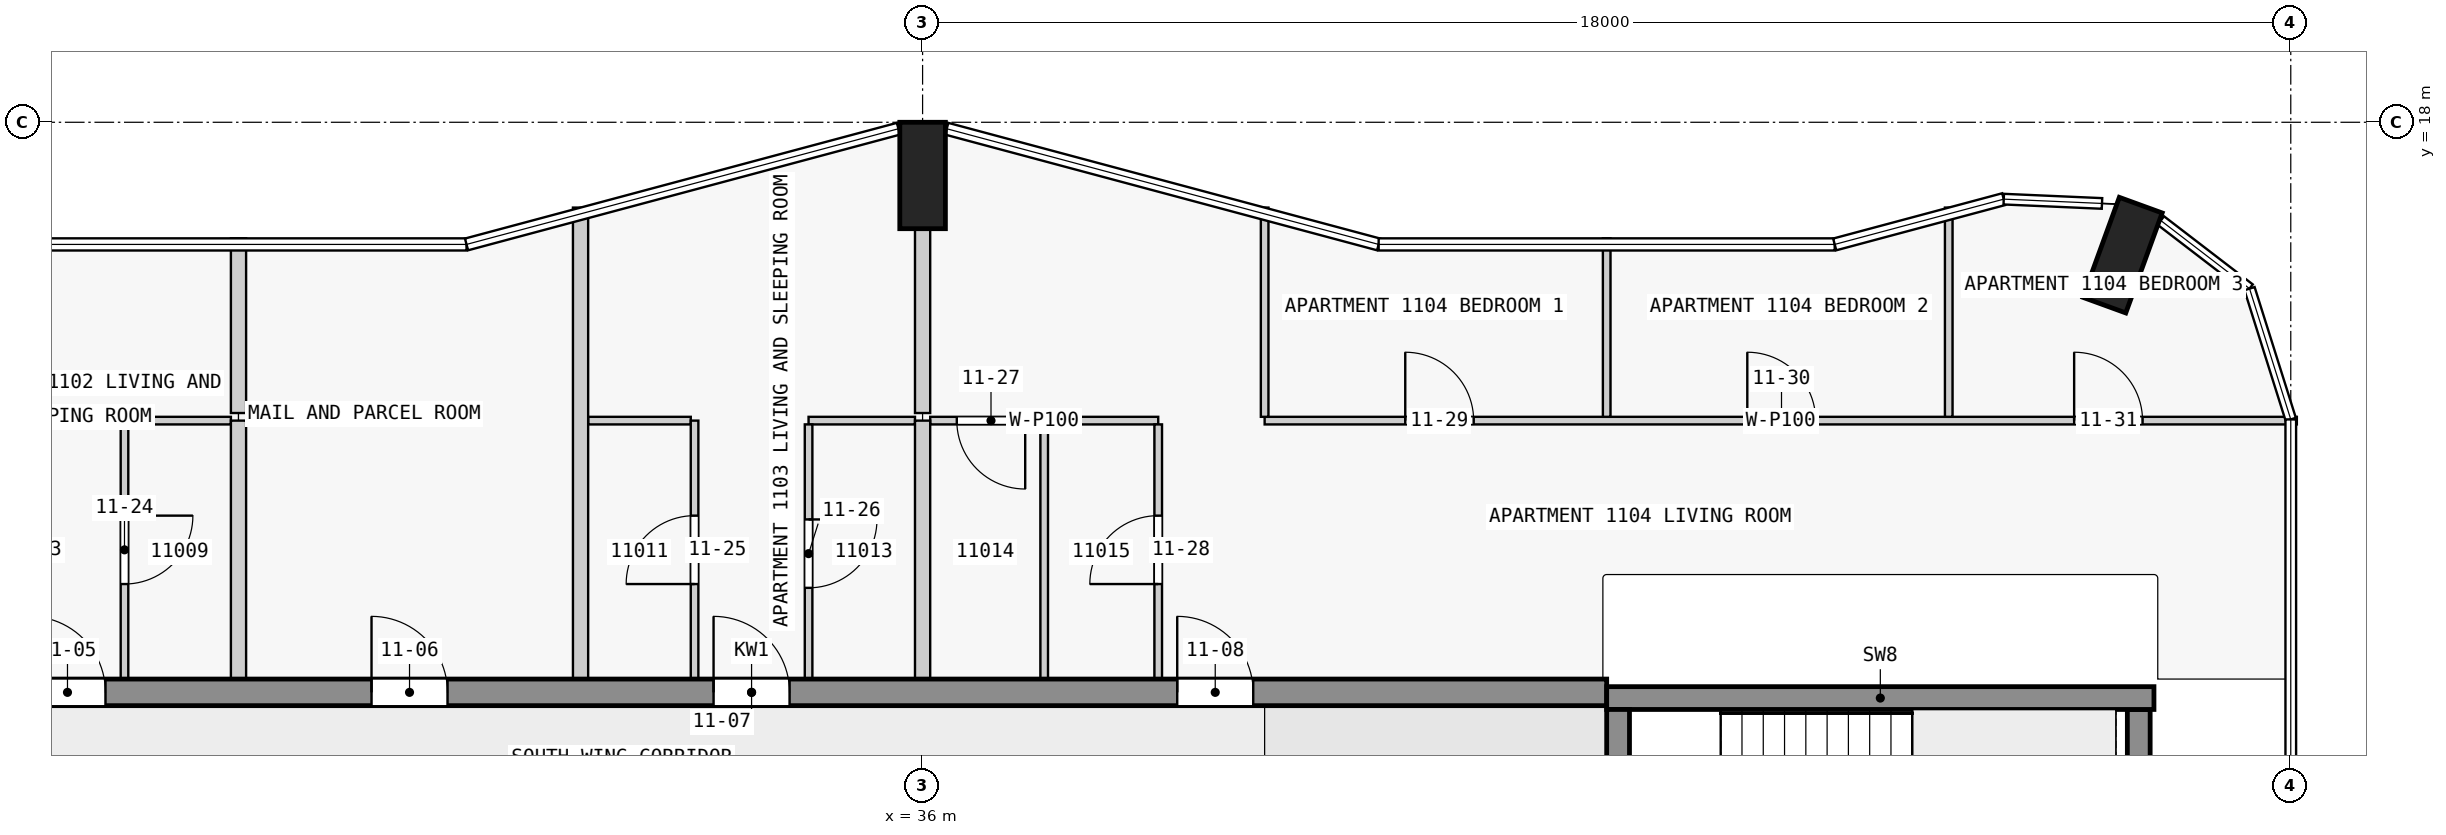
"""IFC4 building model, lengths in metres.
Left out: names, types, materials, properties, quantities, classifications, styles, units other than length and angle.
Written with IfcOpenShell. Run it as: python <this file> out.ifc"""

import sys

from ifc_helpers import new_model, si_unit, direction, frame, frame_2d, origin, origin_2d, place, context, subcontext, project, spatial, rectangle, extrude, element, fill, save


model = new_model("IFC4")
c1 = context("Model", 3, precision=1e-05, world=origin(), true_north=direction((0.0, 1.0)))
c2 = subcontext(c1, "Body", "Model", "MODEL_VIEW")
j1 = project(units=[si_unit("LENGTHUNIT", "METRE"), si_unit("PLANEANGLEUNIT", "RADIAN")], contexts=[c1])
p1 = place(None, origin())
s1 = spatial("IfcSite", under=j1, at=p1, CompositionType="ELEMENT")
p2 = place(p1, origin())
s2 = spatial("IfcBuilding", under=s1, at=p2, CompositionType="ELEMENT")
p3 = place(p2, frame((0.0, 0.0, 47.8)))
s3 = spatial("IfcBuildingStorey", under=s2, at=p3, CompositionType="ELEMENT", Elevation=47.8)
for number, where, z_axis, x_axis in (
    (1, (51.787, 16.252, 0.0), (0.0, 0.0, 1.0), (-0.94, 0.342, 0.0)),
    (2, (36.0, 17.3, 0.0), (0.0, 0.0, 1.0), (1.0, 0.0, 0.0)),
):
    element("IfcColumn", number, at=place(p3, frame(where, z_axis=z_axis, x_axis=x_axis)), inside=s3, PredefinedType="COLUMN", context=c2, shape_type="SweptSolid", body=[
        extrude(rectangle(XDim=0.6, YDim=1.4, at=origin_2d()), origin(), (0.0, 0.0, 1.0), 3.5),
    ])
p4 = place(p3, frame((45.15, 7.725, 0.0), z_axis=(0.0, 0.0, 1.0), x_axis=(0.0, 1.0, 0.0)))
e3 = element("IfcWall", 3, at=p4, inside=s3, PredefinedType="SHEAR", context=c2, shape_type="SweptSolid", body=[
    extrude(rectangle(XDim=2.55, YDim=0.3, at=frame_2d((1.275, 0.0))), origin(), (0.0, 0.0, 1.0), 3.5),
])
p5 = place(p4, frame((0.725, 0.0, 0.0)))
e4 = element("IfcOpeningElement", 4, at=p5, cuts=e3, PredefinedType="OPENING", context=c2, shape_type="SweptSolid", body=[
    extrude(rectangle(XDim=1.1, YDim=2.1, at=frame_2d((0.55, 1.05))), frame((0.0, 0.16, 0.0), z_axis=(0.0, -1.0, 0.0), x_axis=(1.0, 0.0, 0.0)), (0.0, 0.0, 1.0), 0.32),
])
p6 = place(p3, frame((52.0, 7.725, 0.0), z_axis=(0.0, 0.0, 1.0), x_axis=(0.0, 1.0, 0.0)))
e5 = element("IfcWall", 5, at=p6, inside=s3, PredefinedType="SHEAR", context=c2, shape_type="SweptSolid", body=[
    extrude(rectangle(XDim=2.55, YDim=0.3, at=frame_2d((1.275, 0.0))), origin(), (0.0, 0.0, 1.0), 3.5),
])
p7 = place(p3, frame((45.0, 10.425, 0.0), z_axis=(0.0, 0.0, 1.0), x_axis=(1.0, 0.0, 0.0)))
e6 = element("IfcWall", 6, at=p7, inside=s3, PredefinedType="SHEAR", context=c2, shape_type="SweptSolid", body=[
    extrude(rectangle(XDim=7.2, YDim=0.3, at=frame_2d((3.6, 0.0))), origin(), (0.0, 0.0, 1.0), 3.5),
])
p8 = place(p3, frame((22.5, 10.5, 0.0), z_axis=(0.0, 0.0, 1.0), x_axis=(1.0, 0.0, 0.0)))
e7 = element("IfcWall", 7, at=p8, inside=s3, PredefinedType="SHEAR", context=c2, shape_type="SweptSolid", body=[
    extrude(rectangle(XDim=22.5, YDim=0.35, at=frame_2d((11.25, 0.0))), origin(), (0.0, 0.0, 1.0), 3.25),
])
p9 = place(p8, frame((1.75, 0.0, 0.0)))
e8 = element("IfcOpeningElement", 8, at=p9, cuts=e7, PredefinedType="OPENING", context=c2, shape_type="SweptSolid", body=[
    extrude(rectangle(XDim=1.0, YDim=2.1, at=frame_2d((0.5, 1.05))), frame((0.0, 0.185, 0.0), z_axis=(0.0, -1.0, 0.0), x_axis=(1.0, 0.0, 0.0)), (0.0, 0.0, 1.0), 0.37),
])
p10 = place(p8, frame((6.25, 0.0, 0.0)))
e9 = element("IfcOpeningElement", 9, at=p10, cuts=e7, PredefinedType="OPENING", context=c2, shape_type="SweptSolid", body=[
    extrude(rectangle(XDim=1.0, YDim=2.1, at=frame_2d((0.5, 1.05))), frame((0.0, 0.185, 0.0), z_axis=(0.0, -1.0, 0.0), x_axis=(1.0, 0.0, 0.0)), (0.0, 0.0, 1.0), 0.37),
])
p11 = place(p8, frame((10.75, 0.0, 0.0)))
e10 = element("IfcOpeningElement", 10, at=p11, cuts=e7, PredefinedType="OPENING", context=c2, shape_type="SweptSolid", body=[
    extrude(rectangle(XDim=1.0, YDim=2.1, at=frame_2d((0.5, 1.05))), frame((0.0, 0.185, 0.0), z_axis=(0.0, -1.0, 0.0), x_axis=(1.0, 0.0, 0.0)), (0.0, 0.0, 1.0), 0.37),
])
p12 = place(p8, frame((16.85, 0.0, 0.0)))
e11 = element("IfcOpeningElement", 11, at=p12, cuts=e7, PredefinedType="OPENING", context=c2, shape_type="SweptSolid", body=[
    extrude(rectangle(XDim=1.0, YDim=2.1, at=frame_2d((0.5, 1.05))), frame((0.0, 0.185, 0.0), z_axis=(0.0, -1.0, 0.0), x_axis=(1.0, 0.0, 0.0)), (0.0, 0.0, 1.0), 0.37),
])
for number, where, z_axis, x_axis in (
    (12, (26.9, 14.075, 0.0), (0.0, 0.0, 1.0), (-1.0, 0.0, 0.0)),
    (13, (32.95, 14.075, 0.0), (0.0, 0.0, 1.0), (-1.0, 0.0, 0.0)),
):
    element("IfcWall", number, at=place(p3, frame(where, z_axis=z_axis, x_axis=x_axis)), inside=s3, PredefinedType="PARTITIONING", context=c2, shape_type="SweptSolid", body=[
        extrude(rectangle(XDim=1.35, YDim=0.1, at=frame_2d((0.675, 0.0))), origin(), (0.0, 0.0, 1.0), 3.25),
    ])
p13 = place(p3, frame((35.9, 14.075, 0.0), z_axis=(0.0, 0.0, 1.0), x_axis=(-1.0, 0.0, 0.0)))
e14 = element("IfcWall", 14, at=p13, inside=s3, PredefinedType="PARTITIONING", context=c2, shape_type="SweptSolid", body=[
    extrude(rectangle(XDim=1.4, YDim=0.1, at=frame_2d((0.7, 0.0))), origin(), (0.0, 0.0, 1.0), 3.25),
])
p14 = place(p3, frame((39.1, 14.075, 0.0), z_axis=(0.0, 0.0, 1.0), x_axis=(-1.0, 0.0, 0.0)))
e15 = element("IfcWall", 15, at=p14, inside=s3, PredefinedType="PARTITIONING", context=c2, shape_type="SweptSolid", body=[
    extrude(rectangle(XDim=3.0, YDim=0.1, at=frame_2d((1.5, 0.0))), origin(), (0.0, 0.0, 1.0), 3.25),
])
p15 = place(p14, frame((1.75, 0.0, 0.0)))
e16 = element("IfcOpeningElement", 16, at=p15, cuts=e15, PredefinedType="OPENING", context=c2, shape_type="SweptSolid", body=[
    extrude(rectangle(XDim=0.9, YDim=2.1, at=frame_2d((0.45, 1.05))), frame((0.0, 0.06, 0.0), z_axis=(0.0, -1.0, 0.0), x_axis=(1.0, 0.0, 0.0)), (0.0, 0.0, 1.0), 0.12),
])
p16 = place(p3, frame((40.5, 14.075, 0.0), z_axis=(0.0, 0.0, 1.0), x_axis=(1.0, 0.0, 0.0)))
e17 = element("IfcWall", 17, at=p16, inside=s3, PredefinedType="PARTITIONING", context=c2, shape_type="SweptSolid", body=[
    extrude(rectangle(XDim=13.58, YDim=0.1, at=frame_2d((6.79, 0.0))), origin(), (0.0, 0.0, 1.0), 3.25),
])
p17 = place(p16, frame((1.85, 0.0, 0.0)))
e18 = element("IfcOpeningElement", 18, at=p17, cuts=e17, PredefinedType="OPENING", context=c2, shape_type="SweptSolid", body=[
    extrude(rectangle(XDim=0.9, YDim=2.1, at=frame_2d((0.45, 1.05))), frame((0.0, 0.06, 0.0), z_axis=(0.0, -1.0, 0.0), x_axis=(1.0, 0.0, 0.0)), (0.0, 0.0, 1.0), 0.12),
])
p18 = place(p16, frame((6.35, 0.0, 0.0)))
e19 = element("IfcOpeningElement", 19, at=p18, cuts=e17, PredefinedType="OPENING", context=c2, shape_type="SweptSolid", body=[
    extrude(rectangle(XDim=0.9, YDim=2.1, at=frame_2d((0.45, 1.05))), frame((0.0, 0.06, 0.0), z_axis=(0.0, -1.0, 0.0), x_axis=(1.0, 0.0, 0.0)), (0.0, 0.0, 1.0), 0.12),
])
p19 = place(p16, frame((10.65, 0.0, 0.0)))
e20 = element("IfcOpeningElement", 20, at=p19, cuts=e17, PredefinedType="OPENING", context=c2, shape_type="SweptSolid", body=[
    extrude(rectangle(XDim=0.9, YDim=2.1, at=frame_2d((0.45, 1.05))), frame((0.0, 0.06, 0.0), z_axis=(0.0, -1.0, 0.0), x_axis=(1.0, 0.0, 0.0)), (0.0, 0.0, 1.0), 0.12),
])
p20 = place(p3, frame((25.5, 14.075, 0.0), z_axis=(0.0, 0.0, 1.0), x_axis=(0.0, -1.0, 0.0)))
e21 = element("IfcWall", 21, at=p20, inside=s3, PredefinedType="PARTITIONING", context=c2, shape_type="SweptSolid", body=[
    extrude(rectangle(XDim=3.4, YDim=0.1, at=frame_2d((1.7, 0.0))), origin(), (0.0, 0.0, 1.0), 3.25),
])
p21 = place(p20, frame((1.25, 0.0, 0.0)))
e22 = element("IfcOpeningElement", 22, at=p21, cuts=e21, PredefinedType="OPENING", context=c2, shape_type="SweptSolid", body=[
    extrude(rectangle(XDim=0.9, YDim=2.1, at=frame_2d((0.45, 1.05))), frame((0.0, 0.06, 0.0), z_axis=(0.0, -1.0, 0.0), x_axis=(1.0, 0.0, 0.0)), (0.0, 0.0, 1.0), 0.12),
])
p22 = place(p3, frame((27.0, 16.473, 0.0), z_axis=(0.0, 0.0, 1.0), x_axis=(0.0, -1.0, 0.0)))
e23 = element("IfcWall", 23, at=p22, inside=s3, PredefinedType="PARTITIONING", context=c2, shape_type="SweptSolid", body=[
    extrude(rectangle(XDim=2.298, YDim=0.2, at=frame_2d((1.149, 0.0))), origin(), (0.0, 0.0, 1.0), 3.25),
])
p23 = place(p3, frame((27.0, 10.675, 0.0), z_axis=(0.0, 0.0, 1.0), x_axis=(0.0, 1.0, 0.0)))
e24 = element("IfcWall", 24, at=p23, inside=s3, PredefinedType="PARTITIONING", context=c2, shape_type="SweptSolid", body=[
    extrude(rectangle(XDim=3.4, YDim=0.2, at=frame_2d((1.7, 0.0))), origin(), (0.0, 0.0, 1.0), 3.25),
])
p24 = place(p3, frame((31.5, 10.675, 0.0), z_axis=(0.0, 0.0, 1.0), x_axis=(0.0, 1.0, 0.0)))
e25 = element("IfcWall", 25, at=p24, inside=s3, PredefinedType="PARTITIONING", context=c2, shape_type="SweptSolid", body=[
    extrude(rectangle(XDim=6.203, YDim=0.2, at=frame_2d((3.101, 0.0))), origin(), (0.0, 0.0, 1.0), 3.25),
])
p25 = place(p3, frame((33.0, 10.675, 0.0), z_axis=(0.0, 0.0, 1.0), x_axis=(0.0, 1.0, 0.0)))
e26 = element("IfcWall", 26, at=p25, inside=s3, PredefinedType="PARTITIONING", context=c2, shape_type="SweptSolid", body=[
    extrude(rectangle(XDim=3.4, YDim=0.1, at=frame_2d((1.7, 0.0))), origin(), (0.0, 0.0, 1.0), 3.25),
])
p26 = place(p25, frame((1.25, 0.0, 0.0)))
e27 = element("IfcOpeningElement", 27, at=p26, cuts=e26, PredefinedType="OPENING", context=c2, shape_type="SweptSolid", body=[
    extrude(rectangle(XDim=0.9, YDim=2.1, at=frame_2d((0.45, 1.05))), frame((0.0, 0.06, 0.0), z_axis=(0.0, -1.0, 0.0), x_axis=(1.0, 0.0, 0.0)), (0.0, 0.0, 1.0), 0.12),
])
p27 = place(p3, frame((34.5, 14.025, 0.0), z_axis=(0.0, 0.0, 1.0), x_axis=(0.0, -1.0, 0.0)))
e28 = element("IfcWall", 28, at=p27, inside=s3, PredefinedType="PARTITIONING", context=c2, shape_type="SweptSolid", body=[
    extrude(rectangle(XDim=3.35, YDim=0.1, at=frame_2d((1.675, 0.0))), origin(), (0.0, 0.0, 1.0), 3.25),
])
p28 = place(p27, frame((1.25, 0.0, 0.0)))
e29 = element("IfcOpeningElement", 29, at=p28, cuts=e28, PredefinedType="OPENING", context=c2, shape_type="SweptSolid", body=[
    extrude(rectangle(XDim=0.9, YDim=2.1, at=frame_2d((0.45, 1.05))), frame((0.0, 0.06, 0.0), z_axis=(0.0, -1.0, 0.0), x_axis=(1.0, 0.0, 0.0)), (0.0, 0.0, 1.0), 0.12),
])
p29 = place(p3, frame((36.0, 16.6, 0.0), z_axis=(0.0, 0.0, 1.0), x_axis=(0.0, -1.0, 0.0)))
e30 = element("IfcWall", 30, at=p29, inside=s3, PredefinedType="PARTITIONING", context=c2, shape_type="SweptSolid", body=[
    extrude(rectangle(XDim=2.425, YDim=0.2, at=frame_2d((1.212, 0.0))), origin(), (0.0, 0.0, 1.0), 3.25),
])
p30 = place(p3, frame((36.0, 10.675, 0.0), z_axis=(0.0, 0.0, 1.0), x_axis=(0.0, 1.0, 0.0)))
e31 = element("IfcWall", 31, at=p30, inside=s3, PredefinedType="PARTITIONING", context=c2, shape_type="SweptSolid", body=[
    extrude(rectangle(XDim=3.4, YDim=0.2, at=frame_2d((1.7, 0.0))), origin(), (0.0, 0.0, 1.0), 3.25),
])
p31 = place(p3, frame((37.6, 10.675, 0.0), z_axis=(0.0, 0.0, 1.0), x_axis=(0.0, 1.0, 0.0)))
e32 = element("IfcWall", 32, at=p31, inside=s3, PredefinedType="PARTITIONING", context=c2, shape_type="SweptSolid", body=[
    extrude(rectangle(XDim=3.35, YDim=0.1, at=frame_2d((1.675, 0.0))), origin(), (0.0, 0.0, 1.0), 3.25),
])
p32 = place(p3, frame((39.1, 10.675, 0.0), z_axis=(0.0, 0.0, 1.0), x_axis=(0.0, 1.0, 0.0)))
e33 = element("IfcWall", 33, at=p32, inside=s3, PredefinedType="PARTITIONING", context=c2, shape_type="SweptSolid", body=[
    extrude(rectangle(XDim=3.35, YDim=0.1, at=frame_2d((1.675, 0.0))), origin(), (0.0, 0.0, 1.0), 3.25),
])
p33 = place(p32, frame((1.25, 0.0, 0.0)))
e34 = element("IfcOpeningElement", 34, at=p33, cuts=e33, PredefinedType="OPENING", context=c2, shape_type="SweptSolid", body=[
    extrude(rectangle(XDim=0.9, YDim=2.1, at=frame_2d((0.45, 1.05))), frame((0.0, 0.06, 0.0), z_axis=(0.0, -1.0, 0.0), x_axis=(1.0, 0.0, 0.0)), (0.0, 0.0, 1.0), 0.12),
])
p34 = place(p3, frame((40.5, 16.878, 0.0), z_axis=(0.0, 0.0, 1.0), x_axis=(0.0, -1.0, 0.0)))
e35 = element("IfcWall", 35, at=p34, inside=s3, PredefinedType="PARTITIONING", context=c2, shape_type="SweptSolid", body=[
    extrude(rectangle(XDim=2.753, YDim=0.1, at=frame_2d((1.376, 0.0))), origin(), (0.0, 0.0, 1.0), 3.25),
])
p35 = place(p3, frame((45.0, 14.125, 0.0), z_axis=(0.0, 0.0, 1.0), x_axis=(0.0, 1.0, 0.0)))
e36 = element("IfcWall", 36, at=p35, inside=s3, PredefinedType="PARTITIONING", context=c2, shape_type="SweptSolid", body=[
    extrude(rectangle(XDim=2.348, YDim=0.1, at=frame_2d((1.174, 0.0))), origin(), (0.0, 0.0, 1.0), 3.25),
])
p36 = place(p3, frame((49.5, 14.125, 0.0), z_axis=(0.0, 0.0, 1.0), x_axis=(0.0, 1.0, 0.0)))
e37 = element("IfcWall", 37, at=p36, inside=s3, PredefinedType="PARTITIONING", context=c2, shape_type="SweptSolid", body=[
    extrude(rectangle(XDim=2.753, YDim=0.1, at=frame_2d((1.376, 0.0))), origin(), (0.0, 0.0, 1.0), 3.25),
])
p37 = place(p9, origin())
e38 = element("IfcDoor", 38, at=p37, inside=s3, OperationType="SINGLE_SWING_LEFT", PredefinedType="DOOR", context=c2, shape_type="SweptSolid", body=[
    extrude(rectangle(XDim=1.0, YDim=2.1, at=frame_2d((0.5, 1.05))), frame((0.0, 0.025, 0.0), z_axis=(0.0, -1.0, 0.0), x_axis=(1.0, 0.0, 0.0)), (0.0, 0.0, 1.0), 0.05),
])
fill(e8, e38)
p38 = place(p10, origin())
e39 = element("IfcDoor", 39, at=p38, inside=s3, OperationType="SINGLE_SWING_LEFT", PredefinedType="DOOR", context=c2, shape_type="SweptSolid", body=[
    extrude(rectangle(XDim=1.0, YDim=2.1, at=frame_2d((0.5, 1.05))), frame((0.0, 0.025, 0.0), z_axis=(0.0, -1.0, 0.0), x_axis=(1.0, 0.0, 0.0)), (0.0, 0.0, 1.0), 0.05),
])
fill(e9, e39)
p39 = place(p11, origin())
e40 = element("IfcDoor", 40, at=p39, inside=s3, OperationType="SINGLE_SWING_LEFT", PredefinedType="DOOR", context=c2, shape_type="SweptSolid", body=[
    extrude(rectangle(XDim=1.0, YDim=2.1, at=frame_2d((0.5, 1.05))), frame((0.0, 0.025, 0.0), z_axis=(0.0, -1.0, 0.0), x_axis=(1.0, 0.0, 0.0)), (0.0, 0.0, 1.0), 0.05),
])
fill(e10, e40)
p40 = place(p12, origin())
e41 = element("IfcDoor", 41, at=p40, inside=s3, OperationType="SINGLE_SWING_RIGHT", PredefinedType="DOOR", context=c2, shape_type="SweptSolid", body=[
    extrude(rectangle(XDim=1.0, YDim=2.1, at=frame_2d((0.5, 1.05))), frame((0.0, 0.025, 0.0), z_axis=(0.0, -1.0, 0.0), x_axis=(1.0, 0.0, 0.0)), (0.0, 0.0, 1.0), 0.05),
])
fill(e11, e41)
p41 = place(p21, origin())
e42 = element("IfcDoor", 42, at=p41, inside=s3, OperationType="SINGLE_SWING_RIGHT", PredefinedType="DOOR", context=c2, shape_type="SweptSolid", body=[
    extrude(rectangle(XDim=0.9, YDim=2.1, at=frame_2d((0.45, 1.05))), frame((0.0, 0.025, 0.0), z_axis=(0.0, -1.0, 0.0), x_axis=(1.0, 0.0, 0.0)), (0.0, 0.0, 1.0), 0.05),
])
fill(e22, e42)
p42 = place(p26, origin())
e43 = element("IfcDoor", 43, at=p42, inside=s3, OperationType="SINGLE_SWING_RIGHT", PredefinedType="DOOR", context=c2, shape_type="SweptSolid", body=[
    extrude(rectangle(XDim=0.9, YDim=2.1, at=frame_2d((0.45, 1.05))), frame((0.0, 0.025, 0.0), z_axis=(0.0, -1.0, 0.0), x_axis=(1.0, 0.0, 0.0)), (0.0, 0.0, 1.0), 0.05),
])
fill(e27, e43)
p43 = place(p28, origin())
e44 = element("IfcDoor", 44, at=p43, inside=s3, OperationType="SINGLE_SWING_RIGHT", PredefinedType="DOOR", context=c2, shape_type="SweptSolid", body=[
    extrude(rectangle(XDim=0.9, YDim=2.1, at=frame_2d((0.45, 1.05))), frame((0.0, 0.025, 0.0), z_axis=(0.0, -1.0, 0.0), x_axis=(1.0, 0.0, 0.0)), (0.0, 0.0, 1.0), 0.05),
])
fill(e29, e44)
p44 = place(p15, origin())
e45 = element("IfcDoor", 45, at=p44, inside=s3, OperationType="SINGLE_SWING_RIGHT", PredefinedType="DOOR", context=c2, shape_type="SweptSolid", body=[
    extrude(rectangle(XDim=0.9, YDim=2.1, at=frame_2d((0.45, 1.05))), frame((0.0, 0.025, 0.0), z_axis=(0.0, -1.0, 0.0), x_axis=(1.0, 0.0, 0.0)), (0.0, 0.0, 1.0), 0.05),
])
fill(e16, e45)
p45 = place(p33, origin())
e46 = element("IfcDoor", 46, at=p45, inside=s3, OperationType="SINGLE_SWING_RIGHT", PredefinedType="DOOR", context=c2, shape_type="SweptSolid", body=[
    extrude(rectangle(XDim=0.9, YDim=2.1, at=frame_2d((0.45, 1.05))), frame((0.0, 0.025, 0.0), z_axis=(0.0, -1.0, 0.0), x_axis=(1.0, 0.0, 0.0)), (0.0, 0.0, 1.0), 0.05),
])
fill(e34, e46)
p46 = place(p17, origin())
e47 = element("IfcDoor", 47, at=p46, inside=s3, OperationType="SINGLE_SWING_LEFT", PredefinedType="DOOR", context=c2, shape_type="SweptSolid", body=[
    extrude(rectangle(XDim=0.9, YDim=2.1, at=frame_2d((0.45, 1.05))), frame((0.0, 0.025, 0.0), z_axis=(0.0, -1.0, 0.0), x_axis=(1.0, 0.0, 0.0)), (0.0, 0.0, 1.0), 0.05),
])
fill(e18, e47)
p47 = place(p18, origin())
e48 = element("IfcDoor", 48, at=p47, inside=s3, OperationType="SINGLE_SWING_RIGHT", PredefinedType="DOOR", context=c2, shape_type="SweptSolid", body=[
    extrude(rectangle(XDim=0.9, YDim=2.1, at=frame_2d((0.45, 1.05))), frame((0.0, 0.025, 0.0), z_axis=(0.0, -1.0, 0.0), x_axis=(1.0, 0.0, 0.0)), (0.0, 0.0, 1.0), 0.05),
])
fill(e19, e48)
p48 = place(p19, origin())
e49 = element("IfcDoor", 49, at=p48, inside=s3, OperationType="SINGLE_SWING_RIGHT", PredefinedType="DOOR", context=c2, shape_type="SweptSolid", body=[
    extrude(rectangle(XDim=0.9, YDim=2.1, at=frame_2d((0.45, 1.05))), frame((0.0, 0.025, 0.0), z_axis=(0.0, -1.0, 0.0), x_axis=(1.0, 0.0, 0.0)), (0.0, 0.0, 1.0), 0.05),
])
fill(e20, e49)
save(model, sys.argv[1])
